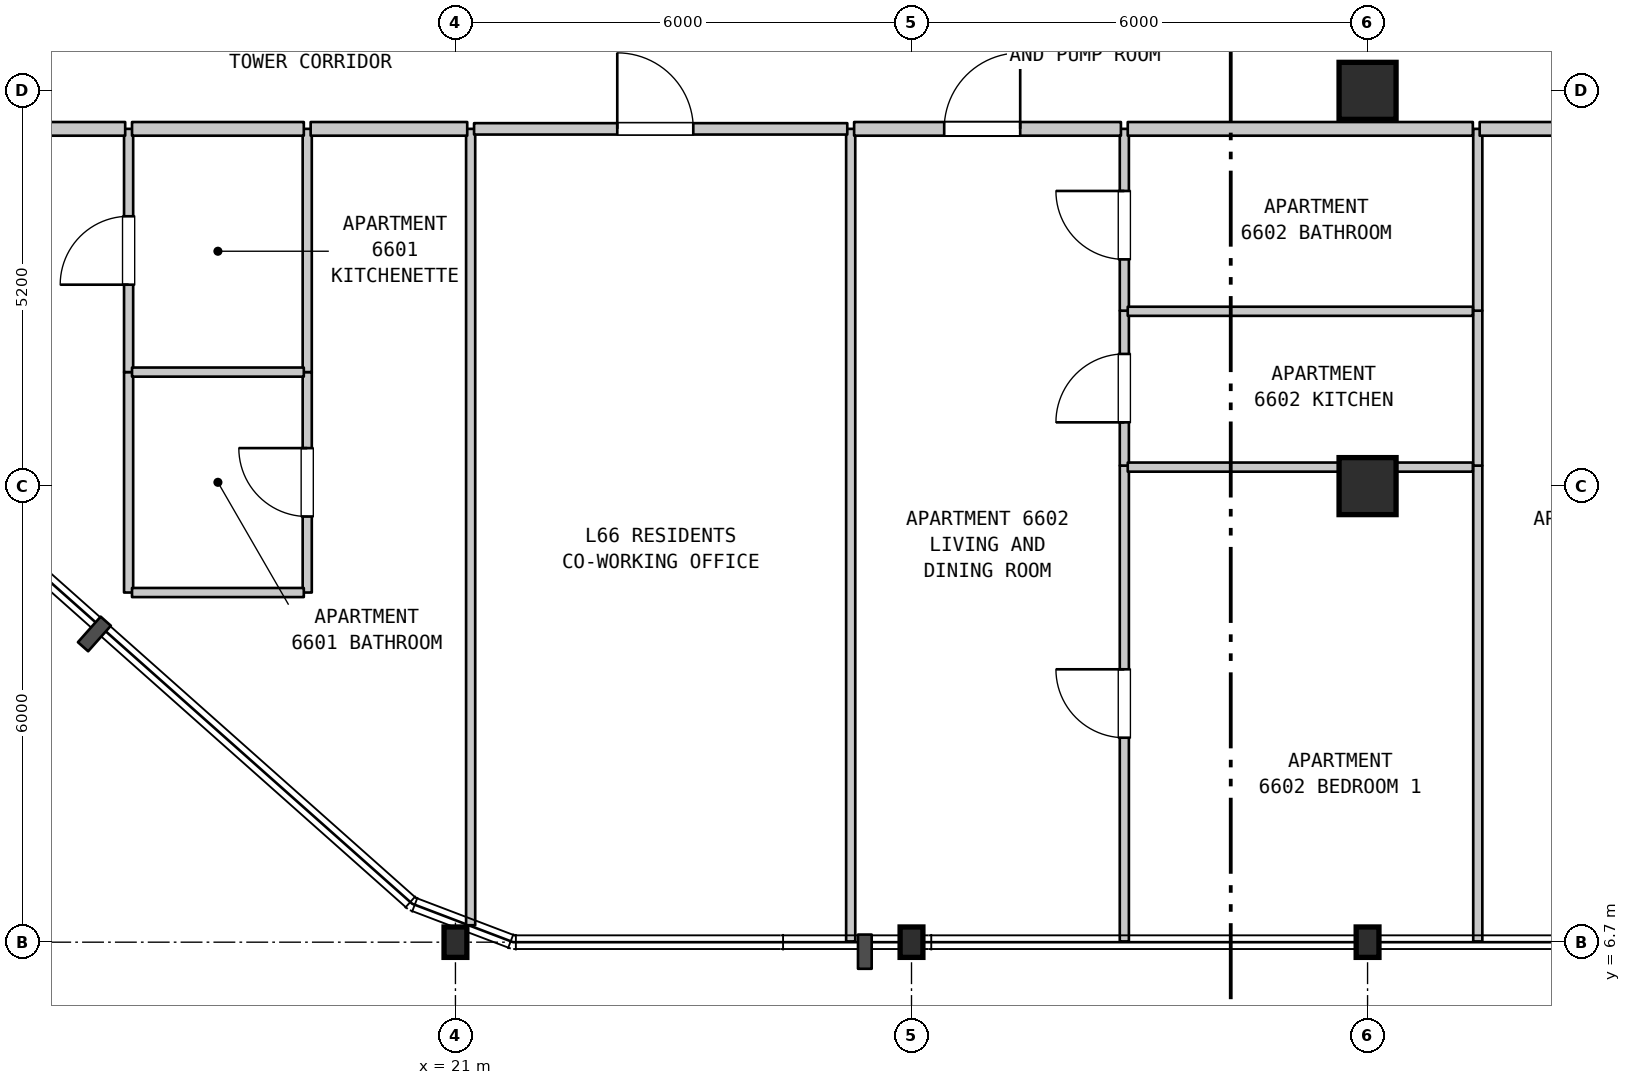
"""IFC4 building model, lengths in metres.
Left out: names, types, materials, properties, quantities, classifications, styles, units other than length and angle.
Written with IfcOpenShell. Run it as: python <this file> out.ifc"""

import sys

from ifc_helpers import new_model, si_unit, direction, frame, frame_2d, origin, origin_2d, place, context, subcontext, project, spatial, rectangle, i_section, extrude, element, fill, save


model = new_model("IFC4")
c1 = context("Model", 3, precision=1e-05, world=origin(), true_north=direction((0.0, 1.0)))
c2 = subcontext(c1, "Body", "Model", "MODEL_VIEW")
j1 = project(units=[si_unit("LENGTHUNIT", "METRE"), si_unit("PLANEANGLEUNIT", "RADIAN")], contexts=[c1])
p1 = place(None, origin())
s1 = spatial("IfcSite", under=j1, at=p1, CompositionType="ELEMENT")
p2 = place(p1, origin())
s2 = spatial("IfcBuilding", under=s1, at=p2, CompositionType="ELEMENT")
p3 = place(p2, frame((0.0, 0.0, 265.8)))
s3 = spatial("IfcBuildingStorey", under=s2, at=p3, CompositionType="ELEMENT", Elevation=265.8)
for number, where, z_axis, x_axis in (
    (1, (21.0, 6.7, 0.0), (0.0, 0.0, 1.0), (1.0, 0.0, 0.0)),
    (2, (27.0, 6.7, 0.0), (0.0, 0.0, 1.0), (1.0, 0.0, 0.0)),
    (3, (33.0, 6.7, 0.0), (0.0, 0.0, 1.0), (1.0, 0.0, 0.0)),
):
    element("IfcColumn", number, at=place(p3, frame(where, z_axis=z_axis, x_axis=x_axis)), inside=s3, PredefinedType="COLUMN", context=c2, shape_type="SweptSolid", body=[
        extrude(i_section(OverallWidth=0.3, OverallDepth=0.4, WebThickness=0.013, FlangeThickness=0.024, FilletRadius=0.027, at=origin_2d()), origin(), (0.0, 0.0, 1.0), 3.7),
    ])
for number, where, z_axis, x_axis in (
    (4, (33.0, 12.7, 0.0), (0.0, 0.0, 1.0), (1.0, 0.0, 0.0)),
    (5, (33.0, 17.9, 0.0), (0.0, 0.0, 1.0), (1.0, 0.0, 0.0)),
):
    element("IfcColumn", number, at=place(p3, frame(where, z_axis=z_axis, x_axis=x_axis)), inside=s3, PredefinedType="COLUMN", context=c2, shape_type="SweptSolid", body=[
        extrude(rectangle(XDim=0.75, YDim=0.75, at=origin_2d()), origin(), (0.0, 0.0, 1.0), 3.7),
    ])
p4 = place(p3, frame((16.7, 11.3, 0.0), z_axis=(0.0, 0.0, 1.0), x_axis=(0.0, 1.0, 0.0)))
e6 = element("IfcWall", 6, at=p4, inside=s3, PredefinedType="PARTITIONING", context=c2, shape_type="SweptSolid", body=[
    extrude(rectangle(XDim=2.9, YDim=0.12, at=frame_2d((1.45, 0.0))), origin(), (0.0, 0.0, 1.0), 3.39),
])
p5 = place(p3, frame((16.7, 14.2, 0.0), z_axis=(0.0, 0.0, 1.0), x_axis=(0.0, 1.0, 0.0)))
e7 = element("IfcWall", 7, at=p5, inside=s3, PredefinedType="PARTITIONING", context=c2, shape_type="SweptSolid", body=[
    extrude(rectangle(XDim=3.2, YDim=0.12, at=frame_2d((1.6, 0.0))), origin(), (0.0, 0.0, 1.0), 3.39),
])
p6 = place(p5, frame((1.15, 0.0, 0.0)))
e8 = element("IfcOpeningElement", 8, at=p6, cuts=e7, PredefinedType="OPENING", context=c2, shape_type="SweptSolid", body=[
    extrude(rectangle(XDim=0.9, YDim=2.15, at=frame_2d((0.45, 1.075))), frame((0.0, 0.07, 0.0), z_axis=(0.0, -1.0, 0.0), x_axis=(1.0, 0.0, 0.0)), (0.0, 0.0, 1.0), 0.14),
])
p7 = place(p3, frame((19.05, 11.3, 0.0), z_axis=(0.0, 0.0, 1.0), x_axis=(0.0, 1.0, 0.0)))
e9 = element("IfcWall", 9, at=p7, inside=s3, PredefinedType="PARTITIONING", context=c2, shape_type="SweptSolid", body=[
    extrude(rectangle(XDim=2.9, YDim=0.12, at=frame_2d((1.45, 0.0))), origin(), (0.0, 0.0, 1.0), 3.39),
])
p8 = place(p7, frame((1.0, 0.0, 0.0)))
e10 = element("IfcOpeningElement", 10, at=p8, cuts=e9, PredefinedType="OPENING", context=c2, shape_type="SweptSolid", body=[
    extrude(rectangle(XDim=0.9, YDim=2.1, at=frame_2d((0.45, 1.05))), frame((0.0, 0.07, 0.0), z_axis=(0.0, -1.0, 0.0), x_axis=(1.0, 0.0, 0.0)), (0.0, 0.0, 1.0), 0.14),
])
p9 = place(p3, frame((19.05, 14.2, 0.0), z_axis=(0.0, 0.0, 1.0), x_axis=(0.0, 1.0, 0.0)))
e11 = element("IfcWall", 11, at=p9, inside=s3, PredefinedType="PARTITIONING", context=c2, shape_type="SweptSolid", body=[
    extrude(rectangle(XDim=3.2, YDim=0.12, at=frame_2d((1.6, 0.0))), origin(), (0.0, 0.0, 1.0), 3.39),
])
p10 = place(p3, frame((21.2, 6.923, 0.0), z_axis=(0.0, 0.0, 1.0), x_axis=(0.0, 1.0, 0.0)))
e12 = element("IfcWall", 12, at=p10, inside=s3, PredefinedType="PARTITIONING", context=c2, shape_type="SweptSolid", body=[
    extrude(rectangle(XDim=10.477, YDim=0.12, at=frame_2d((5.238, 0.0))), origin(), (0.0, 0.0, 1.0), 3.39),
])
p11 = place(p3, frame((26.2, 6.71, 0.0), z_axis=(0.0, 0.0, 1.0), x_axis=(0.0, 1.0, 0.0)))
e13 = element("IfcWall", 13, at=p11, inside=s3, PredefinedType="PARTITIONING", context=c2, shape_type="SweptSolid", body=[
    extrude(rectangle(XDim=10.69, YDim=0.12, at=frame_2d((5.345, 0.0))), origin(), (0.0, 0.0, 1.0), 3.39),
])
p12 = place(p3, frame((29.8, 6.71, 0.0), z_axis=(0.0, 0.0, 1.0), x_axis=(0.0, 1.0, 0.0)))
e14 = element("IfcWall", 14, at=p12, inside=s3, PredefinedType="PARTITIONING", context=c2, shape_type="SweptSolid", body=[
    extrude(rectangle(XDim=6.26, YDim=0.12, at=frame_2d((3.13, 0.0))), origin(), (0.0, 0.0, 1.0), 3.39),
])
p13 = place(p12, frame((2.68, 0.0, 0.0)))
e15 = element("IfcOpeningElement", 15, at=p13, cuts=e14, PredefinedType="OPENING", context=c2, shape_type="SweptSolid", body=[
    extrude(rectangle(XDim=0.9, YDim=2.15, at=frame_2d((0.45, 1.075))), frame((0.0, 0.07, 0.0), z_axis=(0.0, -1.0, 0.0), x_axis=(1.0, 0.0, 0.0)), (0.0, 0.0, 1.0), 0.14),
])
p14 = place(p3, frame((29.8, 12.97, 0.0), z_axis=(0.0, 0.0, 1.0), x_axis=(0.0, 1.0, 0.0)))
e16 = element("IfcWall", 16, at=p14, inside=s3, PredefinedType="PARTITIONING", context=c2, shape_type="SweptSolid", body=[
    extrude(rectangle(XDim=2.038, YDim=0.12, at=frame_2d((1.019, 0.0))), origin(), (0.0, 0.0, 1.0), 3.39),
])
p15 = place(p14, frame((0.569, 0.0, 0.0)))
e17 = element("IfcOpeningElement", 17, at=p15, cuts=e16, PredefinedType="OPENING", context=c2, shape_type="SweptSolid", body=[
    extrude(rectangle(XDim=0.9, YDim=2.15, at=frame_2d((0.45, 1.075))), frame((0.0, 0.07, 0.0), z_axis=(0.0, -1.0, 0.0), x_axis=(1.0, 0.0, 0.0)), (0.0, 0.0, 1.0), 0.14),
])
p16 = place(p3, frame((29.8, 15.008, 0.0), z_axis=(0.0, 0.0, 1.0), x_axis=(0.0, 1.0, 0.0)))
e18 = element("IfcWall", 18, at=p16, inside=s3, PredefinedType="PARTITIONING", context=c2, shape_type="SweptSolid", body=[
    extrude(rectangle(XDim=2.392, YDim=0.12, at=frame_2d((1.196, 0.0))), origin(), (0.0, 0.0, 1.0), 3.39),
])
p17 = place(p16, frame((0.675, 0.0, 0.0)))
e19 = element("IfcOpeningElement", 19, at=p17, cuts=e18, PredefinedType="OPENING", context=c2, shape_type="SweptSolid", body=[
    extrude(rectangle(XDim=0.9, YDim=2.1, at=frame_2d((0.45, 1.05))), frame((0.0, 0.07, 0.0), z_axis=(0.0, -1.0, 0.0), x_axis=(1.0, 0.0, 0.0)), (0.0, 0.0, 1.0), 0.14),
])
p18 = place(p3, frame((34.45, 6.71, 0.0), z_axis=(0.0, 0.0, 1.0), x_axis=(0.0, 1.0, 0.0)))
e20 = element("IfcWall", 20, at=p18, inside=s3, PredefinedType="PARTITIONING", context=c2, shape_type="SweptSolid", body=[
    extrude(rectangle(XDim=6.26, YDim=0.12, at=frame_2d((3.13, 0.0))), origin(), (0.0, 0.0, 1.0), 3.39),
])
p19 = place(p3, frame((34.45, 12.97, 0.0), z_axis=(0.0, 0.0, 1.0), x_axis=(0.0, 1.0, 0.0)))
e21 = element("IfcWall", 21, at=p19, inside=s3, PredefinedType="PARTITIONING", context=c2, shape_type="SweptSolid", body=[
    extrude(rectangle(XDim=2.038, YDim=0.12, at=frame_2d((1.019, 0.0))), origin(), (0.0, 0.0, 1.0), 3.39),
])
p20 = place(p3, frame((34.45, 15.008, 0.0), z_axis=(0.0, 0.0, 1.0), x_axis=(0.0, 1.0, 0.0)))
e22 = element("IfcWall", 22, at=p20, inside=s3, PredefinedType="PARTITIONING", context=c2, shape_type="SweptSolid", body=[
    extrude(rectangle(XDim=2.392, YDim=0.12, at=frame_2d((1.196, 0.0))), origin(), (0.0, 0.0, 1.0), 3.39),
])
p21 = place(p3, frame((16.745, 11.3, 0.0), z_axis=(0.0, 0.0, 1.0), x_axis=(1.0, 0.0, 0.0)))
e23 = element("IfcWall", 23, at=p21, inside=s3, PredefinedType="PARTITIONING", context=c2, shape_type="SweptSolid", body=[
    extrude(rectangle(XDim=2.26, YDim=0.12, at=frame_2d((1.13, 0.0))), origin(), (0.0, 0.0, 1.0), 3.39),
])
p22 = place(p3, frame((29.845, 12.95, 0.0), z_axis=(0.0, 0.0, 1.0), x_axis=(1.0, 0.0, 0.0)))
e24 = element("IfcWall", 24, at=p22, inside=s3, PredefinedType="PARTITIONING", context=c2, shape_type="SweptSolid", body=[
    extrude(rectangle(XDim=4.54, YDim=0.12, at=frame_2d((2.27, 0.0))), origin(), (0.0, 0.0, 1.0), 3.39),
])
p23 = place(p3, frame((16.745, 14.2, 0.0), z_axis=(0.0, 0.0, 1.0), x_axis=(1.0, 0.0, 0.0)))
e25 = element("IfcWall", 25, at=p23, inside=s3, PredefinedType="PARTITIONING", context=c2, shape_type="SweptSolid", body=[
    extrude(rectangle(XDim=2.26, YDim=0.12, at=frame_2d((1.13, 0.0))), origin(), (0.0, 0.0, 1.0), 3.39),
])
p24 = place(p3, frame((29.845, 15.0, 0.0), z_axis=(0.0, 0.0, 1.0), x_axis=(1.0, 0.0, 0.0)))
e26 = element("IfcWall", 26, at=p24, inside=s3, PredefinedType="PARTITIONING", context=c2, shape_type="SweptSolid", body=[
    extrude(rectangle(XDim=4.54, YDim=0.12, at=frame_2d((2.27, 0.0))), origin(), (0.0, 0.0, 1.0), 3.39),
])
p25 = place(p3, frame((12.975, 17.4, 0.0), z_axis=(0.0, 0.0, 1.0), x_axis=(1.0, 0.0, 0.0)))
e27 = element("IfcWall", 27, at=p25, inside=s3, PredefinedType="STANDARD", context=c2, shape_type="SweptSolid", body=[
    extrude(rectangle(XDim=3.68, YDim=0.18, at=frame_2d((1.84, 0.0))), origin(), (0.0, 0.0, 1.0), 3.39),
])
p26 = place(p25, frame((0.322, 0.0, 0.0)))
e28 = element("IfcOpeningElement", 28, at=p26, cuts=e27, PredefinedType="OPENING", context=c2, shape_type="SweptSolid", body=[
    extrude(rectangle(XDim=1.0, YDim=2.15, at=frame_2d((0.5, 1.075))), frame((0.0, 0.1, 0.0), z_axis=(0.0, -1.0, 0.0), x_axis=(1.0, 0.0, 0.0)), (0.0, 0.0, 1.0), 0.2),
])
p27 = place(p3, frame((16.745, 17.4, 0.0), z_axis=(0.0, 0.0, 1.0), x_axis=(1.0, 0.0, 0.0)))
e29 = element("IfcWall", 29, at=p27, inside=s3, PredefinedType="STANDARD", context=c2, shape_type="SweptSolid", body=[
    extrude(rectangle(XDim=2.26, YDim=0.18, at=frame_2d((1.13, 0.0))), origin(), (0.0, 0.0, 1.0), 3.39),
])
p28 = place(p3, frame((19.095, 17.4, 0.0), z_axis=(0.0, 0.0, 1.0), x_axis=(1.0, 0.0, 0.0)))
e30 = element("IfcWall", 30, at=p28, inside=s3, PredefinedType="STANDARD", context=c2, shape_type="SweptSolid", body=[
    extrude(rectangle(XDim=2.06, YDim=0.18, at=frame_2d((1.03, 0.0))), origin(), (0.0, 0.0, 1.0), 3.39),
])
p29 = place(p3, frame((21.245, 17.4, 0.0), z_axis=(0.0, 0.0, 1.0), x_axis=(1.0, 0.0, 0.0)))
e31 = element("IfcWall", 31, at=p29, inside=s3, PredefinedType="STANDARD", context=c2, shape_type="SweptSolid", body=[
    extrude(rectangle(XDim=4.91, YDim=0.15, at=frame_2d((2.455, 0.0))), origin(), (0.0, 0.0, 1.0), 3.39),
])
p30 = place(p29, frame((1.884, 0.0, 0.0)))
e32 = element("IfcOpeningElement", 32, at=p30, cuts=e31, PredefinedType="OPENING", context=c2, shape_type="SweptSolid", body=[
    extrude(rectangle(XDim=1.0, YDim=2.15, at=frame_2d((0.5, 1.075))), frame((0.0, 0.085, 0.0), z_axis=(0.0, -1.0, 0.0), x_axis=(1.0, 0.0, 0.0)), (0.0, 0.0, 1.0), 0.17),
])
p31 = place(p3, frame((26.245, 17.4, 0.0), z_axis=(0.0, 0.0, 1.0), x_axis=(1.0, 0.0, 0.0)))
e33 = element("IfcWall", 33, at=p31, inside=s3, PredefinedType="STANDARD", context=c2, shape_type="SweptSolid", body=[
    extrude(rectangle(XDim=3.51, YDim=0.18, at=frame_2d((1.755, 0.0))), origin(), (0.0, 0.0, 1.0), 3.39),
])
p32 = place(p31, frame((1.185, 0.0, 0.0)))
e34 = element("IfcOpeningElement", 34, at=p32, cuts=e33, PredefinedType="OPENING", context=c2, shape_type="SweptSolid", body=[
    extrude(rectangle(XDim=1.0, YDim=2.15, at=frame_2d((0.5, 1.075))), frame((0.0, 0.1, 0.0), z_axis=(0.0, -1.0, 0.0), x_axis=(1.0, 0.0, 0.0)), (0.0, 0.0, 1.0), 0.2),
])
p33 = place(p3, frame((29.845, 17.4, 0.0), z_axis=(0.0, 0.0, 1.0), x_axis=(1.0, 0.0, 0.0)))
e35 = element("IfcWall", 35, at=p33, inside=s3, PredefinedType="STANDARD", context=c2, shape_type="SweptSolid", body=[
    extrude(rectangle(XDim=4.54, YDim=0.18, at=frame_2d((2.27, 0.0))), origin(), (0.0, 0.0, 1.0), 3.39),
])
p34 = place(p3, frame((34.475, 17.4, 0.0), z_axis=(0.0, 0.0, 1.0), x_axis=(1.0, 0.0, 0.0)))
e36 = element("IfcWall", 36, at=p34, inside=s3, PredefinedType="STANDARD", context=c2, shape_type="SweptSolid", body=[
    extrude(rectangle(XDim=3.51, YDim=0.18, at=frame_2d((1.755, 0.0))), origin(), (0.0, 0.0, 1.0), 3.39),
])
p35 = place(p34, frame((1.185, 0.0, 0.0)))
e37 = element("IfcOpeningElement", 37, at=p35, cuts=e36, PredefinedType="OPENING", context=c2, shape_type="SweptSolid", body=[
    extrude(rectangle(XDim=1.0, YDim=2.15, at=frame_2d((0.5, 1.075))), frame((0.0, 0.1, 0.0), z_axis=(0.0, -1.0, 0.0), x_axis=(1.0, 0.0, 0.0)), (0.0, 0.0, 1.0), 0.2),
])
p36 = place(p6, origin())
e38 = element("IfcDoor", 38, at=p36, inside=s3, OperationType="SINGLE_SWING_LEFT", PredefinedType="DOOR", context=c2, shape_type="SweptSolid", body=[
    extrude(rectangle(XDim=0.9, YDim=2.15, at=frame_2d((0.45, 1.075))), frame((0.0, 0.025, 0.0), z_axis=(0.0, -1.0, 0.0), x_axis=(1.0, 0.0, 0.0)), (0.0, 0.0, 1.0), 0.05),
])
fill(e8, e38)
p37 = place(p8, origin())
e39 = element("IfcDoor", 39, at=p37, inside=s3, OperationType="SINGLE_SWING_RIGHT", PredefinedType="DOOR", context=c2, shape_type="SweptSolid", body=[
    extrude(rectangle(XDim=0.9, YDim=2.1, at=frame_2d((0.45, 1.05))), frame((0.0, 0.025, 0.0), z_axis=(0.0, -1.0, 0.0), x_axis=(1.0, 0.0, 0.0)), (0.0, 0.0, 1.0), 0.05),
])
fill(e10, e39)
p38 = place(p13, origin())
e40 = element("IfcDoor", 40, at=p38, inside=s3, OperationType="SINGLE_SWING_RIGHT", PredefinedType="DOOR", context=c2, shape_type="SweptSolid", body=[
    extrude(rectangle(XDim=0.9, YDim=2.15, at=frame_2d((0.45, 1.075))), frame((0.0, 0.025, 0.0), z_axis=(0.0, -1.0, 0.0), x_axis=(1.0, 0.0, 0.0)), (0.0, 0.0, 1.0), 0.05),
])
fill(e15, e40)
p39 = place(p15, origin())
e41 = element("IfcDoor", 41, at=p39, inside=s3, OperationType="SINGLE_SWING_LEFT", PredefinedType="DOOR", context=c2, shape_type="SweptSolid", body=[
    extrude(rectangle(XDim=0.9, YDim=2.15, at=frame_2d((0.45, 1.075))), frame((0.0, 0.025, 0.0), z_axis=(0.0, -1.0, 0.0), x_axis=(1.0, 0.0, 0.0)), (0.0, 0.0, 1.0), 0.05),
])
fill(e17, e41)
p40 = place(p17, origin())
e42 = element("IfcDoor", 42, at=p40, inside=s3, OperationType="SINGLE_SWING_RIGHT", PredefinedType="DOOR", context=c2, shape_type="SweptSolid", body=[
    extrude(rectangle(XDim=0.9, YDim=2.1, at=frame_2d((0.45, 1.05))), frame((0.0, 0.025, 0.0), z_axis=(0.0, -1.0, 0.0), x_axis=(1.0, 0.0, 0.0)), (0.0, 0.0, 1.0), 0.05),
])
fill(e19, e42)
p41 = place(p30, origin())
e43 = element("IfcDoor", 43, at=p41, inside=s3, OperationType="SINGLE_SWING_LEFT", PredefinedType="DOOR", context=c2, shape_type="SweptSolid", body=[
    extrude(rectangle(XDim=1.0, YDim=2.15, at=frame_2d((0.5, 1.075))), frame((0.0, 0.025, 0.0), z_axis=(0.0, -1.0, 0.0), x_axis=(1.0, 0.0, 0.0)), (0.0, 0.0, 1.0), 0.05),
])
fill(e32, e43)
p42 = place(p32, origin())
e44 = element("IfcDoor", 44, at=p42, inside=s3, OperationType="SINGLE_SWING_RIGHT", PredefinedType="DOOR", context=c2, shape_type="SweptSolid", body=[
    extrude(rectangle(XDim=1.0, YDim=2.15, at=frame_2d((0.5, 1.075))), frame((0.0, 0.025, 0.0), z_axis=(0.0, -1.0, 0.0), x_axis=(1.0, 0.0, 0.0)), (0.0, 0.0, 1.0), 0.05),
])
fill(e34, e44)
save(model, sys.argv[1])
